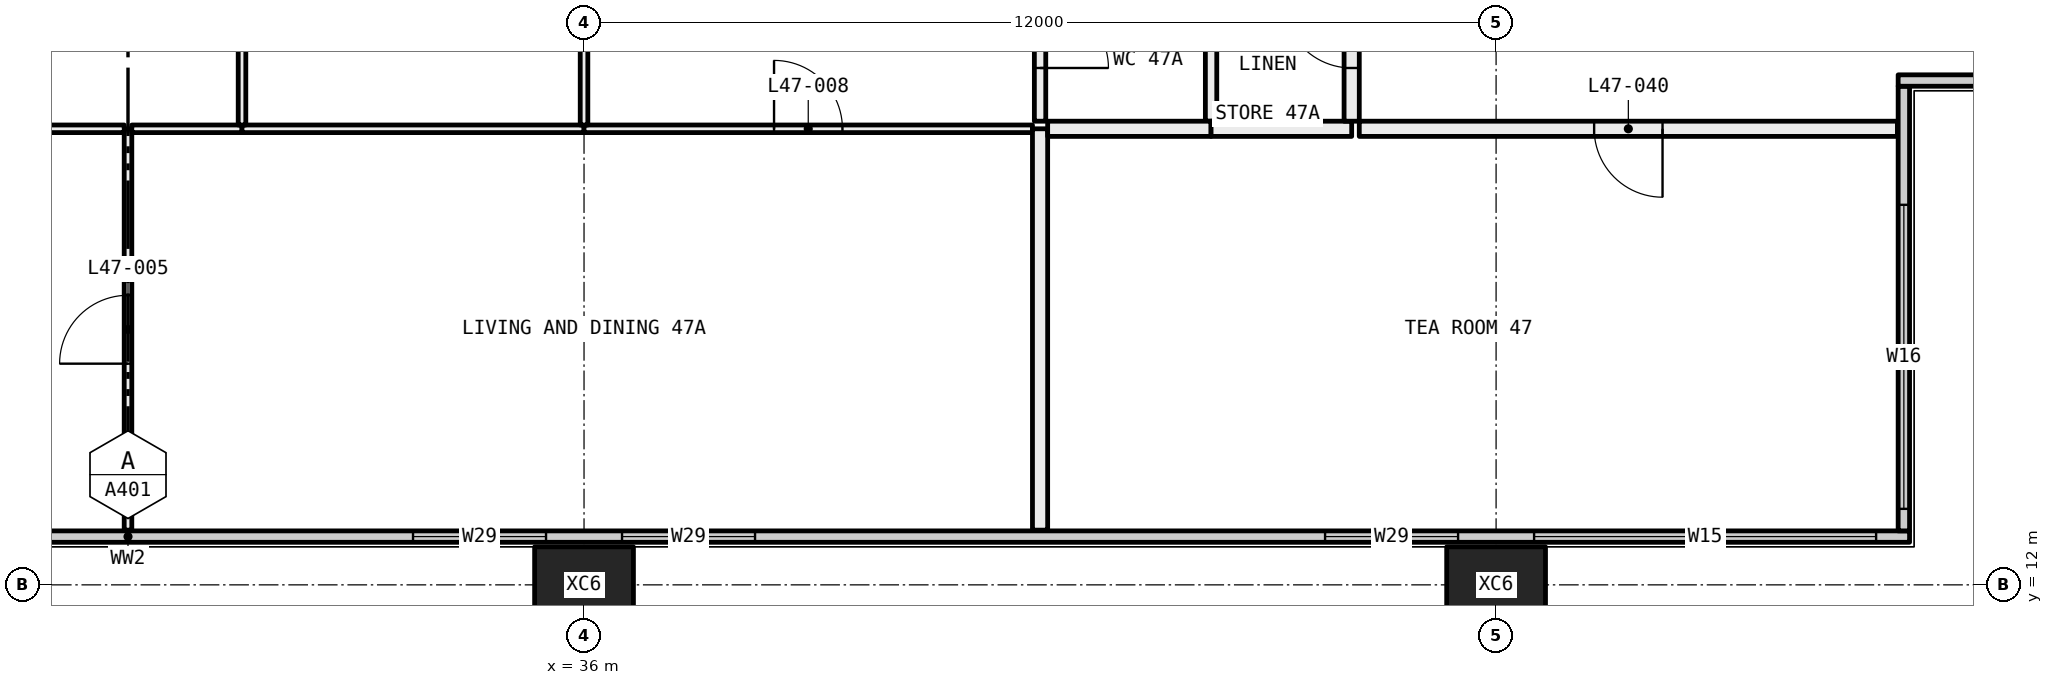
"""IFC4 building model, lengths in metres.
Left out: names, types, materials, properties, quantities, classifications, styles, units other than length and angle.
Written with IfcOpenShell. Run it as: python <this file> out.ifc"""

import sys

from ifc_helpers import new_model, si_unit, direction, frame, frame_2d, origin, origin_2d, place, context, subcontext, project, spatial, rectangle, hollow_rectangle, extrude, element, fill, save


model = new_model("IFC4")
c1 = context("Model", 3, precision=1e-05, world=origin(), true_north=direction((0.0, 1.0)))
c2 = subcontext(c1, "Body", "Model", "MODEL_VIEW")
j1 = project(units=[si_unit("LENGTHUNIT", "METRE"), si_unit("PLANEANGLEUNIT", "RADIAN")], contexts=[c1])
p1 = place(None, origin())
s1 = spatial("IfcSite", under=j1, at=p1, CompositionType="ELEMENT")
p2 = place(p1, origin())
s2 = spatial("IfcBuilding", under=s1, at=p2, CompositionType="ELEMENT")
p3 = place(p2, frame((0.0, 0.0, 178.95)))
s3 = spatial("IfcBuildingStorey", under=s2, at=p3, CompositionType="ELEMENT", Elevation=178.95)
for number, where, z_axis, x_axis in (
    (1, (36.0, 12.0, -0.4), (0.0, 0.0, 1.0), (1.0, 0.0, 0.0)),
    (2, (48.0, 12.0, -0.4), (0.0, 0.0, 1.0), (1.0, 0.0, 0.0)),
):
    element("IfcColumn", number, at=place(p3, frame(where, z_axis=z_axis, x_axis=x_axis)), inside=s3, PredefinedType="COLUMN", context=c2, shape_type="SweptSolid", body=[
        extrude(hollow_rectangle(XDim=1.3, YDim=1.0, WallThickness=0.05, at=origin_2d()), origin(), (0.0, 0.0, 1.0), 3.45),
    ])
p4 = place(p3, frame((6.56, 12.635, 0.0), z_axis=(0.0, 0.0, 1.0), x_axis=(1.0, 0.0, 0.0)))
e3 = element("IfcWall", 3, at=p4, inside=s3, PredefinedType="ELEMENTEDWALL", context=c2, shape_type="SweptSolid", body=[
    extrude(rectangle(XDim=46.88, YDim=0.15, at=frame_2d((23.44, 0.0))), origin(), (0.0, 0.0, 1.0), 3.05),
])
p5 = place(p4, frame((0.44, 0.0, 0.45)))
e4 = element("IfcOpeningElement", 4, at=p5, cuts=e3, PredefinedType="OPENING", context=c2, shape_type="SweptSolid", body=[
    extrude(rectangle(XDim=4.5, YDim=2.55, at=frame_2d((2.25, 1.275))), frame((0.0, 0.085, 0.0), z_axis=(0.0, -1.0, 0.0), x_axis=(1.0, 0.0, 0.0)), (0.0, 0.0, 1.0), 0.17),
])
p6 = place(p4, frame((5.94, 0.0, 0.45)))
e5 = element("IfcOpeningElement", 5, at=p6, cuts=e3, PredefinedType="OPENING", context=c2, shape_type="SweptSolid", body=[
    extrude(rectangle(XDim=1.75, YDim=2.55, at=frame_2d((0.875, 1.275))), frame((0.0, 0.085, 0.0), z_axis=(0.0, -1.0, 0.0), x_axis=(1.0, 0.0, 0.0)), (0.0, 0.0, 1.0), 0.17),
])
p7 = place(p4, frame((15.19, 0.0, 0.45)))
e6 = element("IfcOpeningElement", 6, at=p7, cuts=e3, PredefinedType="OPENING", context=c2, shape_type="SweptSolid", body=[
    extrude(rectangle(XDim=1.75, YDim=2.55, at=frame_2d((0.875, 1.275))), frame((0.0, 0.085, 0.0), z_axis=(0.0, -1.0, 0.0), x_axis=(1.0, 0.0, 0.0)), (0.0, 0.0, 1.0), 0.17),
])
p8 = place(p4, frame((17.94, 0.0, 0.45)))
e7 = element("IfcOpeningElement", 7, at=p8, cuts=e3, PredefinedType="OPENING", context=c2, shape_type="SweptSolid", body=[
    extrude(rectangle(XDim=1.75, YDim=2.55, at=frame_2d((0.875, 1.275))), frame((0.0, 0.085, 0.0), z_axis=(0.0, -1.0, 0.0), x_axis=(1.0, 0.0, 0.0)), (0.0, 0.0, 1.0), 0.17),
])
p9 = place(p4, frame((27.19, 0.0, 0.45)))
e8 = element("IfcOpeningElement", 8, at=p9, cuts=e3, PredefinedType="OPENING", context=c2, shape_type="SweptSolid", body=[
    extrude(rectangle(XDim=1.75, YDim=2.55, at=frame_2d((0.875, 1.275))), frame((0.0, 0.085, 0.0), z_axis=(0.0, -1.0, 0.0), x_axis=(1.0, 0.0, 0.0)), (0.0, 0.0, 1.0), 0.17),
])
p10 = place(p4, frame((29.94, 0.0, 0.45)))
e9 = element("IfcOpeningElement", 9, at=p10, cuts=e3, PredefinedType="OPENING", context=c2, shape_type="SweptSolid", body=[
    extrude(rectangle(XDim=1.75, YDim=2.55, at=frame_2d((0.875, 1.275))), frame((0.0, 0.085, 0.0), z_axis=(0.0, -1.0, 0.0), x_axis=(1.0, 0.0, 0.0)), (0.0, 0.0, 1.0), 0.17),
])
p11 = place(p4, frame((39.19, 0.0, 0.45)))
e10 = element("IfcOpeningElement", 10, at=p11, cuts=e3, PredefinedType="OPENING", context=c2, shape_type="SweptSolid", body=[
    extrude(rectangle(XDim=1.75, YDim=2.55, at=frame_2d((0.875, 1.275))), frame((0.0, 0.085, 0.0), z_axis=(0.0, -1.0, 0.0), x_axis=(1.0, 0.0, 0.0)), (0.0, 0.0, 1.0), 0.17),
])
p12 = place(p4, frame((41.94, 0.0, 0.45)))
e11 = element("IfcOpeningElement", 11, at=p12, cuts=e3, PredefinedType="OPENING", context=c2, shape_type="SweptSolid", body=[
    extrude(rectangle(XDim=4.5, YDim=2.55, at=frame_2d((2.25, 1.275))), frame((0.0, 0.085, 0.0), z_axis=(0.0, -1.0, 0.0), x_axis=(1.0, 0.0, 0.0)), (0.0, 0.0, 1.0), 0.17),
])
p13 = place(p3, frame((53.365, 12.71, 0.0), z_axis=(0.0, 0.0, 1.0), x_axis=(0.0, 1.0, 0.0)))
e12 = element("IfcWall", 12, at=p13, inside=s3, PredefinedType="ELEMENTEDWALL", context=c2, shape_type="SweptSolid", body=[
    extrude(rectangle(XDim=5.85, YDim=0.15, at=frame_2d((2.925, 0.0))), origin(), (0.0, 0.0, 1.0), 3.05),
])
p14 = place(p13, frame((0.29, 0.0, 0.45)))
e13 = element("IfcOpeningElement", 13, at=p14, cuts=e12, PredefinedType="OPENING", context=c2, shape_type="SweptSolid", body=[
    extrude(rectangle(XDim=4.0, YDim=2.55, at=frame_2d((2.0, 1.275))), frame((0.0, 0.085, 0.0), z_axis=(0.0, -1.0, 0.0), x_axis=(1.0, 0.0, 0.0)), (0.0, 0.0, 1.0), 0.17),
])
p15 = place(p3, frame((53.29, 18.635, 0.0), z_axis=(0.0, 0.0, 1.0), x_axis=(1.0, 0.0, 0.0)))
e14 = element("IfcWall", 14, at=p15, inside=s3, PredefinedType="ELEMENTEDWALL", context=c2, shape_type="SweptSolid", body=[
    extrude(rectangle(XDim=6.15, YDim=0.15, at=frame_2d((3.075, 0.0))), origin(), (0.0, 0.0, 1.0), 3.05),
])
p16 = place(p15, frame((1.71, 0.0, 0.45)))
e15 = element("IfcOpeningElement", 15, at=p16, cuts=e14, PredefinedType="OPENING", context=c2, shape_type="SweptSolid", body=[
    extrude(rectangle(XDim=4.0, YDim=2.55, at=frame_2d((2.0, 1.275))), frame((0.0, 0.085, 0.0), z_axis=(0.0, -1.0, 0.0), x_axis=(1.0, 0.0, 0.0)), (0.0, 0.0, 1.0), 0.17),
])
p17 = place(p3, frame((30.0, 12.72, 0.0), z_axis=(0.0, 0.0, 1.0), x_axis=(0.0, 1.0, 0.0)))
e16 = element("IfcWall", 16, at=p17, inside=s3, PredefinedType="PARTITIONING", context=c2, shape_type="SweptSolid", body=[
    extrude(rectangle(XDim=5.28, YDim=0.1, at=frame_2d((2.64, 0.0))), origin(), (0.0, 0.0, 1.0), 3.05),
])
p18 = place(p17, frame((2.19, 0.0, 0.0)))
e17 = element("IfcOpeningElement", 17, at=p18, cuts=e16, PredefinedType="OPENING", context=c2, shape_type="SweptSolid", body=[
    extrude(rectangle(XDim=0.9, YDim=2.1, at=frame_2d((0.45, 1.05))), frame((0.0, 0.06, 0.0), z_axis=(0.0, -1.0, 0.0), x_axis=(1.0, 0.0, 0.0)), (0.0, 0.0, 1.0), 0.12),
])
p19 = place(p3, frame((29.95, 18.0, 0.0), z_axis=(0.0, 0.0, 1.0), x_axis=(-1.0, 0.0, 0.0)))
e18 = element("IfcWall", 18, at=p19, inside=s3, PredefinedType="PARTITIONING", context=c2, shape_type="SweptSolid", body=[
    extrude(rectangle(XDim=3.95, YDim=0.1, at=frame_2d((1.975, 0.0))), origin(), (0.0, 0.0, 1.0), 3.05),
])
p20 = place(p19, frame((1.525, 0.0, 0.0)))
e19 = element("IfcOpeningElement", 19, at=p20, cuts=e18, PredefinedType="OPENING", context=c2, shape_type="SweptSolid", body=[
    extrude(rectangle(XDim=0.9, YDim=2.1, at=frame_2d((0.45, 1.05))), frame((0.0, 0.06, 0.0), z_axis=(0.0, -1.0, 0.0), x_axis=(1.0, 0.0, 0.0)), (0.0, 0.0, 1.0), 0.12),
])
p21 = place(p3, frame((31.5, 18.0, 0.0), z_axis=(0.0, 0.0, 1.0), x_axis=(-1.0, 0.0, 0.0)))
e20 = element("IfcWall", 20, at=p21, inside=s3, PredefinedType="PARTITIONING", context=c2, shape_type="SweptSolid", body=[
    extrude(rectangle(XDim=1.45, YDim=0.1, at=frame_2d((0.725, 0.0))), origin(), (0.0, 0.0, 1.0), 3.05),
])
p22 = place(p3, frame((36.0, 18.0, 0.0), z_axis=(0.0, 0.0, 1.0), x_axis=(-1.0, 0.0, 0.0)))
e21 = element("IfcWall", 21, at=p22, inside=s3, PredefinedType="PARTITIONING", context=c2, shape_type="SweptSolid", body=[
    extrude(rectangle(XDim=4.5, YDim=0.1, at=frame_2d((2.25, 0.0))), origin(), (0.0, 0.0, 1.0), 2.45),
])
p23 = place(p3, frame((41.9, 18.0, 0.0), z_axis=(0.0, 0.0, 1.0), x_axis=(-1.0, 0.0, 0.0)))
e22 = element("IfcWall", 22, at=p23, inside=s3, PredefinedType="PARTITIONING", context=c2, shape_type="SweptSolid", body=[
    extrude(rectangle(XDim=5.9, YDim=0.1, at=frame_2d((2.95, 0.0))), origin(), (0.0, 0.0, 1.0), 2.45),
])
p24 = place(p23, frame((2.5, 0.0, 0.0)))
e23 = element("IfcOpeningElement", 23, at=p24, cuts=e22, PredefinedType="OPENING", context=c2, shape_type="SweptSolid", body=[
    extrude(rectangle(XDim=0.9, YDim=2.1, at=frame_2d((0.45, 1.05))), frame((0.0, 0.06, 0.0), z_axis=(0.0, -1.0, 0.0), x_axis=(1.0, 0.0, 0.0)), (0.0, 0.0, 1.0), 0.12),
])
p25 = place(p3, frame((42.0, 12.72, 0.0), z_axis=(0.0, 0.0, 1.0), x_axis=(0.0, 1.0, 0.0)))
e24 = element("IfcWall", 24, at=p25, inside=s3, PredefinedType="PARTITIONING", context=c2, shape_type="SweptSolid", body=[
    extrude(rectangle(XDim=5.28, YDim=0.2, at=frame_2d((2.64, 0.0))), origin(), (0.0, 0.0, 1.0), 3.05),
])
p26 = place(p3, frame((31.5, 18.05, 0.0), z_axis=(0.0, 0.0, 1.0), x_axis=(0.0, 1.0, 0.0)))
e25 = element("IfcWall", 25, at=p26, inside=s3, PredefinedType="PARTITIONING", context=c2, shape_type="SweptSolid", body=[
    extrude(rectangle(XDim=6.25, YDim=0.1, at=frame_2d((3.125, 0.0))), origin(), (0.0, 0.0, 1.0), 2.45),
])
p27 = place(p26, frame((2.675, 0.0, 0.0)))
e26 = element("IfcOpeningElement", 26, at=p27, cuts=e25, PredefinedType="OPENING", context=c2, shape_type="SweptSolid", body=[
    extrude(rectangle(XDim=0.9, YDim=2.1, at=frame_2d((0.45, 1.05))), frame((0.0, 0.06, 0.0), z_axis=(0.0, -1.0, 0.0), x_axis=(1.0, 0.0, 0.0)), (0.0, 0.0, 1.0), 0.12),
])
p28 = place(p3, frame((36.0, 18.05, 0.0), z_axis=(0.0, 0.0, 1.0), x_axis=(0.0, 1.0, 0.0)))
e27 = element("IfcWall", 27, at=p28, inside=s3, PredefinedType="PARTITIONING", context=c2, shape_type="SweptSolid", body=[
    extrude(rectangle(XDim=5.3, YDim=0.1, at=frame_2d((2.65, 0.0))), origin(), (0.0, 0.0, 1.0), 2.45),
])
p29 = place(p3, frame((42.0, 18.1, 0.0), z_axis=(0.0, 0.0, 1.0), x_axis=(0.0, 1.0, 0.0)))
e28 = element("IfcWall", 28, at=p29, inside=s3, PredefinedType="PARTITIONING", context=c2, shape_type="SweptSolid", body=[
    extrude(rectangle(XDim=2.3, YDim=0.15, at=frame_2d((1.15, 0.0))), origin(), (0.0, 0.0, 1.0), 3.05),
])
p30 = place(p29, frame((0.7, 0.0, 0.0)))
e29 = element("IfcOpeningElement", 29, at=p30, cuts=e28, PredefinedType="OPENING", context=c2, shape_type="SweptSolid", body=[
    extrude(rectangle(XDim=0.9, YDim=2.1, at=frame_2d((0.45, 1.05))), frame((0.0, 0.085, 0.0), z_axis=(0.0, -1.0, 0.0), x_axis=(1.0, 0.0, 0.0)), (0.0, 0.0, 1.0), 0.17),
])
p31 = place(p3, frame((44.25, 18.1, 0.0), z_axis=(0.0, 0.0, 1.0), x_axis=(0.0, 1.0, 0.0)))
e30 = element("IfcWall", 30, at=p31, inside=s3, PredefinedType="PARTITIONING", context=c2, shape_type="SweptSolid", body=[
    extrude(rectangle(XDim=2.3, YDim=0.15, at=frame_2d((1.15, 0.0))), origin(), (0.0, 0.0, 1.0), 3.05),
])
p32 = place(p3, frame((42.1, 18.0, 0.0), z_axis=(0.0, 0.0, 1.0), x_axis=(1.0, 0.0, 0.0)))
e31 = element("IfcWall", 31, at=p32, inside=s3, PredefinedType="PARTITIONING", context=c2, shape_type="SweptSolid", body=[
    extrude(rectangle(XDim=2.15, YDim=0.2, at=frame_2d((1.075, 0.0))), origin(), (0.0, 0.0, 1.0), 3.05),
])
p33 = place(p3, frame((44.25, 18.0, 0.0), z_axis=(0.0, 0.0, 1.0), x_axis=(1.0, 0.0, 0.0)))
e32 = element("IfcWall", 32, at=p33, inside=s3, PredefinedType="PARTITIONING", context=c2, shape_type="SweptSolid", body=[
    extrude(rectangle(XDim=1.85, YDim=0.2, at=frame_2d((0.925, 0.0))), origin(), (0.0, 0.0, 1.0), 3.05),
])
p34 = place(p3, frame((46.1, 18.1, 0.0), z_axis=(0.0, 0.0, 1.0), x_axis=(0.0, 1.0, 0.0)))
e33 = element("IfcWall", 33, at=p34, inside=s3, PredefinedType="PARTITIONING", context=c2, shape_type="SweptSolid", body=[
    extrude(rectangle(XDim=2.3, YDim=0.2, at=frame_2d((1.15, 0.0))), origin(), (0.0, 0.0, 1.0), 3.05),
])
p35 = place(p34, frame((0.7, 0.0, 0.0)))
e34 = element("IfcOpeningElement", 34, at=p35, cuts=e33, PredefinedType="OPENING", context=c2, shape_type="SweptSolid", body=[
    extrude(rectangle(XDim=0.9, YDim=2.1, at=frame_2d((0.45, 1.05))), frame((0.0, 0.11, 0.0), z_axis=(0.0, -1.0, 0.0), x_axis=(1.0, 0.0, 0.0)), (0.0, 0.0, 1.0), 0.22),
])
p36 = place(p3, frame((53.28, 18.0, 0.0), z_axis=(0.0, 0.0, 1.0), x_axis=(-1.0, 0.0, 0.0)))
e35 = element("IfcWall", 35, at=p36, inside=s3, PredefinedType="PARTITIONING", context=c2, shape_type="SweptSolid", body=[
    extrude(rectangle(XDim=7.08, YDim=0.2, at=frame_2d((3.54, 0.0))), origin(), (0.0, 0.0, 1.0), 3.05),
])
p37 = place(p36, frame((3.09, 0.0, 0.0)))
e36 = element("IfcOpeningElement", 36, at=p37, cuts=e35, PredefinedType="OPENING", context=c2, shape_type="SweptSolid", body=[
    extrude(rectangle(XDim=0.9, YDim=2.1, at=frame_2d((0.45, 1.05))), frame((0.0, 0.11, 0.0), z_axis=(0.0, -1.0, 0.0), x_axis=(1.0, 0.0, 0.0)), (0.0, 0.0, 1.0), 0.22),
])
p38 = place(p9, origin())
e37 = element("IfcWindow", 37, at=p38, inside=s3, PartitioningType="SINGLE_PANEL", PredefinedType="WINDOW", context=c2, shape_type="SweptSolid", body=[
    extrude(rectangle(XDim=1.75, YDim=2.55, at=frame_2d((0.875, 1.275))), frame((0.0, 0.03, 0.0), z_axis=(0.0, -1.0, 0.0), x_axis=(1.0, 0.0, 0.0)), (0.0, 0.0, 1.0), 0.06),
])
fill(e8, e37)
p39 = place(p10, origin())
e38 = element("IfcWindow", 38, at=p39, inside=s3, PartitioningType="SINGLE_PANEL", PredefinedType="WINDOW", context=c2, shape_type="SweptSolid", body=[
    extrude(rectangle(XDim=1.75, YDim=2.55, at=frame_2d((0.875, 1.275))), frame((0.0, 0.03, 0.0), z_axis=(0.0, -1.0, 0.0), x_axis=(1.0, 0.0, 0.0)), (0.0, 0.0, 1.0), 0.06),
])
fill(e9, e38)
p40 = place(p11, origin())
e39 = element("IfcWindow", 39, at=p40, inside=s3, PartitioningType="SINGLE_PANEL", PredefinedType="WINDOW", context=c2, shape_type="SweptSolid", body=[
    extrude(rectangle(XDim=1.75, YDim=2.55, at=frame_2d((0.875, 1.275))), frame((0.0, 0.03, 0.0), z_axis=(0.0, -1.0, 0.0), x_axis=(1.0, 0.0, 0.0)), (0.0, 0.0, 1.0), 0.06),
])
fill(e10, e39)
p41 = place(p12, origin())
e40 = element("IfcWindow", 40, at=p41, inside=s3, PartitioningType="SINGLE_PANEL", PredefinedType="WINDOW", context=c2, shape_type="SweptSolid", body=[
    extrude(rectangle(XDim=4.5, YDim=2.55, at=frame_2d((2.25, 1.275))), frame((0.0, 0.03, 0.0), z_axis=(0.0, -1.0, 0.0), x_axis=(1.0, 0.0, 0.0)), (0.0, 0.0, 1.0), 0.06),
])
fill(e11, e40)
p42 = place(p14, origin())
e41 = element("IfcWindow", 41, at=p42, inside=s3, PartitioningType="SINGLE_PANEL", PredefinedType="WINDOW", context=c2, shape_type="SweptSolid", body=[
    extrude(rectangle(XDim=4.0, YDim=2.55, at=frame_2d((2.0, 1.275))), frame((0.0, 0.03, 0.0), z_axis=(0.0, -1.0, 0.0), x_axis=(1.0, 0.0, 0.0)), (0.0, 0.0, 1.0), 0.06),
])
fill(e13, e41)
p43 = place(p18, origin())
e42 = element("IfcDoor", 42, at=p43, inside=s3, OperationType="SINGLE_SWING_RIGHT", PredefinedType="DOOR", context=c2, shape_type="SweptSolid", body=[
    extrude(rectangle(XDim=0.9, YDim=2.1, at=frame_2d((0.45, 1.05))), frame((0.0, 0.025, 0.0), z_axis=(0.0, -1.0, 0.0), x_axis=(1.0, 0.0, 0.0)), (0.0, 0.0, 1.0), 0.05),
])
fill(e17, e42)
p44 = place(p24, frame((0.9, 0.0, 0.0), x_axis=(-1.0, 0.0, 0.0)))
e43 = element("IfcDoor", 43, at=p44, inside=s3, OperationType="SINGLE_SWING_RIGHT", PredefinedType="DOOR", context=c2, shape_type="SweptSolid", body=[
    extrude(rectangle(XDim=0.9, YDim=2.1, at=frame_2d((0.45, 1.05))), frame((0.0, 0.025, 0.0), z_axis=(0.0, -1.0, 0.0), x_axis=(1.0, 0.0, 0.0)), (0.0, 0.0, 1.0), 0.05),
])
fill(e23, e43)
p45 = place(p30, frame((0.9, 0.0, 0.0), x_axis=(-1.0, 0.0, 0.0)))
e44 = element("IfcDoor", 44, at=p45, inside=s3, OperationType="SINGLE_SWING_LEFT", PredefinedType="DOOR", context=c2, shape_type="SweptSolid", body=[
    extrude(rectangle(XDim=0.9, YDim=2.1, at=frame_2d((0.45, 1.05))), frame((0.0, 0.025, 0.0), z_axis=(0.0, -1.0, 0.0), x_axis=(1.0, 0.0, 0.0)), (0.0, 0.0, 1.0), 0.05),
])
fill(e29, e44)
p46 = place(p35, origin())
e45 = element("IfcDoor", 45, at=p46, inside=s3, OperationType="SINGLE_SWING_LEFT", PredefinedType="DOOR", context=c2, shape_type="SweptSolid", body=[
    extrude(rectangle(XDim=0.9, YDim=2.1, at=frame_2d((0.45, 1.05))), frame((0.0, 0.025, 0.0), z_axis=(0.0, -1.0, 0.0), x_axis=(1.0, 0.0, 0.0)), (0.0, 0.0, 1.0), 0.05),
])
fill(e34, e45)
p47 = place(p37, origin())
e46 = element("IfcDoor", 46, at=p47, inside=s3, OperationType="SINGLE_SWING_RIGHT", PredefinedType="DOOR", context=c2, shape_type="SweptSolid", body=[
    extrude(rectangle(XDim=0.9, YDim=2.1, at=frame_2d((0.45, 1.05))), frame((0.0, 0.025, 0.0), z_axis=(0.0, -1.0, 0.0), x_axis=(1.0, 0.0, 0.0)), (0.0, 0.0, 1.0), 0.05),
])
fill(e36, e46)
save(model, sys.argv[1])
